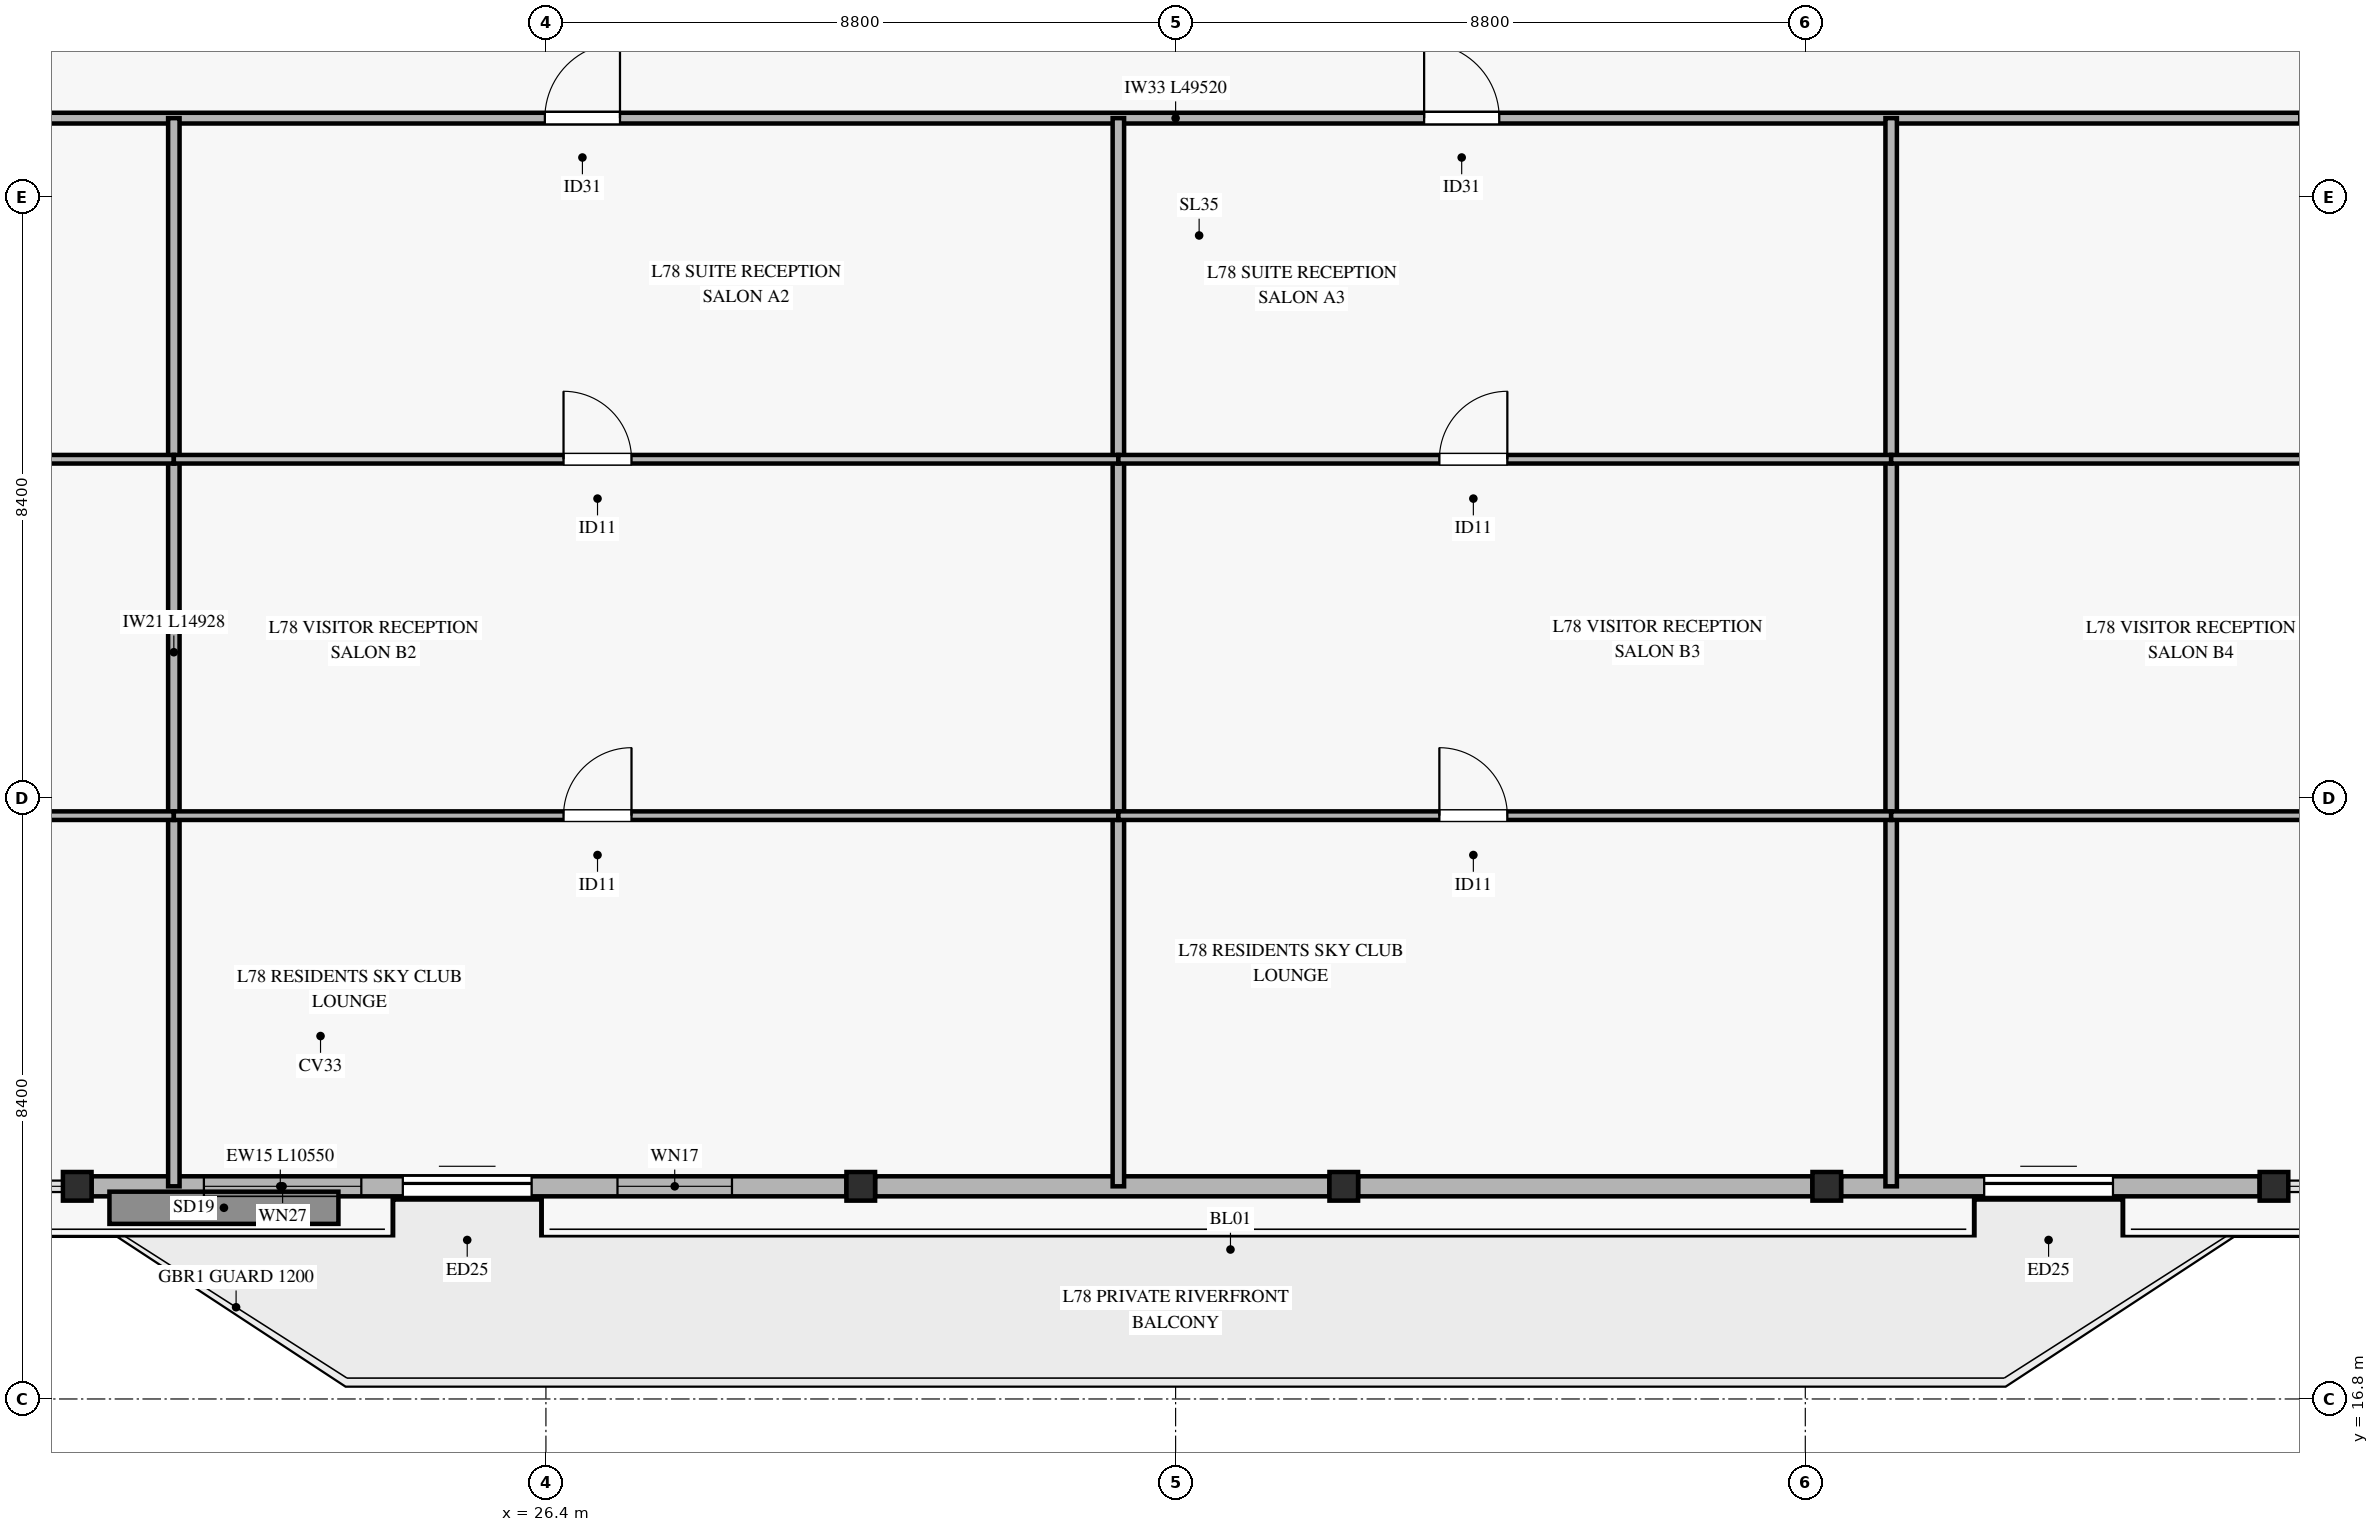
"""IFC4 building model, lengths in metres.
Left out: names, types, materials, properties, quantities, classifications, styles, units other than length and angle.
Written with IfcOpenShell. Run it as: python <this file> out.ifc"""

import sys

from ifc_helpers import new_model, si_unit, direction, frame, frame_2d, origin, origin_2d, place, context, subcontext, project, spatial, rectangle, hollow_rectangle, extrude, source, transform, mapped, element, fill, save


model = new_model("IFC4")
c1 = context("Model", 3, precision=1e-05, world=origin(), true_north=direction((0.0, 1.0)))
c2 = subcontext(c1, "Body", "Model", "MODEL_VIEW")
j1 = project(units=[si_unit("LENGTHUNIT", "METRE"), si_unit("PLANEANGLEUNIT", "RADIAN")], contexts=[c1])
p1 = place(None, origin())
s1 = spatial("IfcSite", under=j1, at=p1, CompositionType="ELEMENT")
p2 = place(p1, origin())
s2 = spatial("IfcBuilding", under=s1, at=p2, CompositionType="ELEMENT")
p3 = place(p2, frame((0.0, 0.0, 304.0)))
s3 = spatial("IfcBuildingStorey", under=s2, at=p3, CompositionType="ELEMENT", Elevation=304.0)
m1 = source(origin(), c2, "Body", "SweptSolid", [
    extrude(hollow_rectangle(XDim=0.4, YDim=0.4, WallThickness=0.02, at=origin_2d()), origin(), (0.0, 0.0, 1.0), 3.185),
])
for number, where, z_axis, x_axis in (
    (1, (19.85, 19.772, 0.0), (0.0, 0.0, 1.0), (1.0, 0.0, 0.0)),
    (2, (30.8, 19.772, 0.0), (0.0, 0.0, 1.0), (1.0, 0.0, 0.0)),
    (3, (37.55, 19.772, 0.0), (0.0, 0.0, 1.0), (1.0, 0.0, 0.0)),
    (4, (44.3, 19.772, 0.0), (0.0, 0.0, 1.0), (1.0, 0.0, 0.0)),
    (5, (50.55, 19.772, 0.0), (0.0, 0.0, 1.0), (1.0, 0.0, 0.0)),
):
    element("IfcColumn", number, at=place(p3, frame(where, z_axis=z_axis, x_axis=x_axis)), inside=s3, PredefinedType="COLUMN", context=c2, shape_type="MappedRepresentation", body=[
        mapped(m1, transform((0.0, 0.0, 0.0), x_axis=(1.0, 0.0, 0.0), y_axis=(0.0, 1.0, 0.0), z_axis=(0.0, 0.0, 1.0), scale=1.0)),
    ])
p4 = place(p3, frame((20.05, 19.772, 0.0), z_axis=(0.0, 0.0, 1.0), x_axis=(1.0, 0.0, 0.0)))
e6 = element("IfcWall", 6, at=p4, inside=s3, PredefinedType="SOLIDWALL", context=c2, shape_type="SweptSolid", body=[
    extrude(rectangle(XDim=10.55, YDim=0.28, at=frame_2d((5.275, 0.0))), origin(), (0.0, 0.0, 1.0), 2.815),
])
p5 = place(p4, frame((4.35, 0.0, 0.0)))
e7 = element("IfcOpeningElement", 7, at=p5, cuts=e6, PredefinedType="OPENING", context=c2, shape_type="SweptSolid", body=[
    extrude(rectangle(XDim=1.8, YDim=2.25, at=frame_2d((0.9, 1.125))), frame((0.0, 0.15, 0.0), z_axis=(0.0, -1.0, 0.0), x_axis=(1.0, 0.0, 0.0)), (0.0, 0.0, 1.0), 0.3),
])
p6 = place(p4, frame((1.57, 0.0, 0.45)))
e8 = element("IfcOpeningElement", 8, at=p6, cuts=e6, PredefinedType="OPENING", context=c2, shape_type="SweptSolid", body=[
    extrude(rectangle(XDim=2.2, YDim=2.1, at=frame_2d((1.1, 1.05))), frame((0.0, 0.15, 0.0), z_axis=(0.0, -1.0, 0.0), x_axis=(1.0, 0.0, 0.0)), (0.0, 0.0, 1.0), 0.3),
])
p7 = place(p4, frame((7.35, 0.0, 0.45)))
e9 = element("IfcOpeningElement", 9, at=p7, cuts=e6, PredefinedType="OPENING", context=c2, shape_type="SweptSolid", body=[
    extrude(rectangle(XDim=1.6, YDim=2.0, at=frame_2d((0.8, 1.0))), frame((0.0, 0.15, 0.0), z_axis=(0.0, -1.0, 0.0), x_axis=(1.0, 0.0, 0.0)), (0.0, 0.0, 1.0), 0.3),
])
for number, where, z_axis, x_axis in (
    (10, (31.0, 19.772, 0.0), (0.0, 0.0, 1.0), (1.0, 0.0, 0.0)),
    (11, (37.75, 19.772, 0.0), (0.0, 0.0, 1.0), (1.0, 0.0, 0.0)),
):
    element("IfcWall", number, at=place(p3, frame(where, z_axis=z_axis, x_axis=x_axis)), inside=s3, PredefinedType="SOLIDWALL", context=c2, shape_type="SweptSolid", body=[
        extrude(rectangle(XDim=6.35, YDim=0.28, at=frame_2d((3.175, 0.0))), origin(), (0.0, 0.0, 1.0), 2.815),
    ])
p8 = place(p3, frame((44.5, 19.772, 0.0), z_axis=(0.0, 0.0, 1.0), x_axis=(1.0, 0.0, 0.0)))
e12 = element("IfcWall", 12, at=p8, inside=s3, PredefinedType="SOLIDWALL", context=c2, shape_type="SweptSolid", body=[
    extrude(rectangle(XDim=5.85, YDim=0.28, at=frame_2d((2.925, 0.0))), origin(), (0.0, 0.0, 1.0), 2.815),
])
p9 = place(p8, frame((2.0, 0.0, 0.0)))
e13 = element("IfcOpeningElement", 13, at=p9, cuts=e12, PredefinedType="OPENING", context=c2, shape_type="SweptSolid", body=[
    extrude(rectangle(XDim=1.8, YDim=2.25, at=frame_2d((0.9, 1.125))), frame((0.0, 0.15, 0.0), z_axis=(0.0, -1.0, 0.0), x_axis=(1.0, 0.0, 0.0)), (0.0, 0.0, 1.0), 0.3),
])
p10 = place(p3, frame((10.44, 34.7, 0.0), z_axis=(0.0, 0.0, 1.0), x_axis=(1.0, 0.0, 0.0)))
e14 = element("IfcWall", 14, at=p10, inside=s3, PredefinedType="PARTITIONING", context=c2, shape_type="SweptSolid", body=[
    extrude(rectangle(XDim=49.52, YDim=0.15, at=frame_2d((24.76, 0.0))), origin(), (0.0, 0.0, 1.0), 2.47),
])
p11 = place(p10, frame((4.382, 0.0, 0.0)))
e15 = element("IfcOpeningElement", 15, at=p11, cuts=e14, PredefinedType="OPENING", context=c2, shape_type="SweptSolid", body=[
    extrude(rectangle(XDim=1.05, YDim=2.15, at=frame_2d((0.525, 1.075))), frame((0.0, 0.085, 0.0), z_axis=(0.0, -1.0, 0.0), x_axis=(1.0, 0.0, 0.0)), (0.0, 0.0, 1.0), 0.17),
])
p12 = place(p10, frame((15.945, 0.0, 0.0)))
e16 = element("IfcOpeningElement", 16, at=p12, cuts=e14, PredefinedType="OPENING", context=c2, shape_type="SweptSolid", body=[
    extrude(rectangle(XDim=1.05, YDim=2.15, at=frame_2d((0.525, 1.075))), frame((0.0, 0.085, 0.0), z_axis=(0.0, -1.0, 0.0), x_axis=(1.0, 0.0, 0.0)), (0.0, 0.0, 1.0), 0.17),
])
p13 = place(p10, frame((28.233, 0.0, 0.0)))
e17 = element("IfcOpeningElement", 17, at=p13, cuts=e14, PredefinedType="OPENING", context=c2, shape_type="SweptSolid", body=[
    extrude(rectangle(XDim=1.05, YDim=2.15, at=frame_2d((0.525, 1.075))), frame((0.0, 0.085, 0.0), z_axis=(0.0, -1.0, 0.0), x_axis=(1.0, 0.0, 0.0)), (0.0, 0.0, 1.0), 0.17),
])
p14 = place(p10, frame((40.462, 0.0, 0.0)))
e18 = element("IfcOpeningElement", 18, at=p14, cuts=e14, PredefinedType="OPENING", context=c2, shape_type="SweptSolid", body=[
    extrude(rectangle(XDim=1.05, YDim=2.15, at=frame_2d((0.525, 1.075))), frame((0.0, 0.085, 0.0), z_axis=(0.0, -1.0, 0.0), x_axis=(1.0, 0.0, 0.0)), (0.0, 0.0, 1.0), 0.17),
])
for number, where, z_axis, x_axis in (
    (19, (21.2, 19.772, 0.0), (0.0, 0.0, 1.0), (0.0, 1.0, 0.0)),
    (20, (34.4, 19.772, 0.0), (0.0, 0.0, 1.0), (0.0, 1.0, 0.0)),
    (21, (45.2, 19.772, 0.0), (0.0, 0.0, 1.0), (0.0, 1.0, 0.0)),
):
    element("IfcWall", number, at=place(p3, frame(where, z_axis=z_axis, x_axis=x_axis)), inside=s3, PredefinedType="PARTITIONING", context=c2, shape_type="SweptSolid", body=[
        extrude(rectangle(XDim=14.928, YDim=0.16, at=frame_2d((7.464, 0.0))), origin(), (0.0, 0.0, 1.0), 2.77),
    ])
p15 = place(p3, frame((10.44, 24.952, 0.0), z_axis=(0.0, 0.0, 1.0), x_axis=(1.0, 0.0, 0.0)))
e22 = element("IfcWall", 22, at=p15, inside=s3, PredefinedType="PARTITIONING", context=c2, shape_type="SweptSolid", body=[
    extrude(rectangle(XDim=10.76, YDim=0.12, at=frame_2d((5.38, 0.0))), origin(), (0.0, 0.0, 1.0), 2.47),
])
p16 = place(p15, frame((4.59, 0.0, 0.0)))
e23 = element("IfcOpeningElement", 23, at=p16, cuts=e22, PredefinedType="OPENING", context=c2, shape_type="SweptSolid", body=[
    extrude(rectangle(XDim=0.95, YDim=2.1, at=frame_2d((0.475, 1.05))), frame((0.0, 0.07, 0.0), z_axis=(0.0, -1.0, 0.0), x_axis=(1.0, 0.0, 0.0)), (0.0, 0.0, 1.0), 0.14),
])
p17 = place(p3, frame((10.44, 29.933, 0.0), z_axis=(0.0, 0.0, 1.0), x_axis=(1.0, 0.0, 0.0)))
e24 = element("IfcWall", 24, at=p17, inside=s3, PredefinedType="PARTITIONING", context=c2, shape_type="SweptSolid", body=[
    extrude(rectangle(XDim=10.76, YDim=0.12, at=frame_2d((5.38, 0.0))), origin(), (0.0, 0.0, 1.0), 2.47),
])
p18 = place(p17, frame((4.59, 0.0, 0.0)))
e25 = element("IfcOpeningElement", 25, at=p18, cuts=e24, PredefinedType="OPENING", context=c2, shape_type="SweptSolid", body=[
    extrude(rectangle(XDim=0.95, YDim=2.1, at=frame_2d((0.475, 1.05))), frame((0.0, 0.07, 0.0), z_axis=(0.0, -1.0, 0.0), x_axis=(1.0, 0.0, 0.0)), (0.0, 0.0, 1.0), 0.14),
])
p19 = place(p3, frame((21.2, 24.952, 0.0), z_axis=(0.0, 0.0, 1.0), x_axis=(1.0, 0.0, 0.0)))
e26 = element("IfcWall", 26, at=p19, inside=s3, PredefinedType="PARTITIONING", context=c2, shape_type="SweptSolid", body=[
    extrude(rectangle(XDim=13.2, YDim=0.12, at=frame_2d((6.6, 0.0))), origin(), (0.0, 0.0, 1.0), 2.47),
])
p20 = place(p19, frame((5.446, 0.0, 0.0)))
e27 = element("IfcOpeningElement", 27, at=p20, cuts=e26, PredefinedType="OPENING", context=c2, shape_type="SweptSolid", body=[
    extrude(rectangle(XDim=0.95, YDim=2.1, at=frame_2d((0.475, 1.05))), frame((0.0, 0.07, 0.0), z_axis=(0.0, -1.0, 0.0), x_axis=(1.0, 0.0, 0.0)), (0.0, 0.0, 1.0), 0.14),
])
p21 = place(p3, frame((21.2, 29.933, 0.0), z_axis=(0.0, 0.0, 1.0), x_axis=(1.0, 0.0, 0.0)))
e28 = element("IfcWall", 28, at=p21, inside=s3, PredefinedType="PARTITIONING", context=c2, shape_type="SweptSolid", body=[
    extrude(rectangle(XDim=13.2, YDim=0.12, at=frame_2d((6.6, 0.0))), origin(), (0.0, 0.0, 1.0), 2.47),
])
p22 = place(p21, frame((5.446, 0.0, 0.0)))
e29 = element("IfcOpeningElement", 29, at=p22, cuts=e28, PredefinedType="OPENING", context=c2, shape_type="SweptSolid", body=[
    extrude(rectangle(XDim=0.95, YDim=2.1, at=frame_2d((0.475, 1.05))), frame((0.0, 0.07, 0.0), z_axis=(0.0, -1.0, 0.0), x_axis=(1.0, 0.0, 0.0)), (0.0, 0.0, 1.0), 0.14),
])
p23 = place(p3, frame((34.4, 24.952, 0.0), z_axis=(0.0, 0.0, 1.0), x_axis=(1.0, 0.0, 0.0)))
e30 = element("IfcWall", 30, at=p23, inside=s3, PredefinedType="PARTITIONING", context=c2, shape_type="SweptSolid", body=[
    extrude(rectangle(XDim=10.8, YDim=0.12, at=frame_2d((5.4, 0.0))), origin(), (0.0, 0.0, 1.0), 2.47),
])
p24 = place(p23, frame((4.486, 0.0, 0.0)))
e31 = element("IfcOpeningElement", 31, at=p24, cuts=e30, PredefinedType="OPENING", context=c2, shape_type="SweptSolid", body=[
    extrude(rectangle(XDim=0.95, YDim=2.1, at=frame_2d((0.475, 1.05))), frame((0.0, 0.07, 0.0), z_axis=(0.0, -1.0, 0.0), x_axis=(1.0, 0.0, 0.0)), (0.0, 0.0, 1.0), 0.14),
])
p25 = place(p3, frame((34.4, 29.933, 0.0), z_axis=(0.0, 0.0, 1.0), x_axis=(1.0, 0.0, 0.0)))
e32 = element("IfcWall", 32, at=p25, inside=s3, PredefinedType="PARTITIONING", context=c2, shape_type="SweptSolid", body=[
    extrude(rectangle(XDim=10.8, YDim=0.12, at=frame_2d((5.4, 0.0))), origin(), (0.0, 0.0, 1.0), 2.47),
])
p26 = place(p25, frame((4.486, 0.0, 0.0)))
e33 = element("IfcOpeningElement", 33, at=p26, cuts=e32, PredefinedType="OPENING", context=c2, shape_type="SweptSolid", body=[
    extrude(rectangle(XDim=0.95, YDim=2.1, at=frame_2d((0.475, 1.05))), frame((0.0, 0.07, 0.0), z_axis=(0.0, -1.0, 0.0), x_axis=(1.0, 0.0, 0.0)), (0.0, 0.0, 1.0), 0.14),
])
p27 = place(p3, frame((45.2, 24.952, 0.0), z_axis=(0.0, 0.0, 1.0), x_axis=(1.0, 0.0, 0.0)))
e34 = element("IfcWall", 34, at=p27, inside=s3, PredefinedType="PARTITIONING", context=c2, shape_type="SweptSolid", body=[
    extrude(rectangle(XDim=14.76, YDim=0.12, at=frame_2d((7.38, 0.0))), origin(), (0.0, 0.0, 1.0), 2.47),
])
p28 = place(p27, frame((5.99, 0.0, 0.0)))
e35 = element("IfcOpeningElement", 35, at=p28, cuts=e34, PredefinedType="OPENING", context=c2, shape_type="SweptSolid", body=[
    extrude(rectangle(XDim=0.95, YDim=2.1, at=frame_2d((0.475, 1.05))), frame((0.0, 0.07, 0.0), z_axis=(0.0, -1.0, 0.0), x_axis=(1.0, 0.0, 0.0)), (0.0, 0.0, 1.0), 0.14),
])
p29 = place(p3, frame((45.2, 29.933, 0.0), z_axis=(0.0, 0.0, 1.0), x_axis=(1.0, 0.0, 0.0)))
e36 = element("IfcWall", 36, at=p29, inside=s3, PredefinedType="PARTITIONING", context=c2, shape_type="SweptSolid", body=[
    extrude(rectangle(XDim=14.76, YDim=0.12, at=frame_2d((7.38, 0.0))), origin(), (0.0, 0.0, 1.0), 2.47),
])
p30 = place(p29, frame((5.99, 0.0, 0.0)))
e37 = element("IfcOpeningElement", 37, at=p30, cuts=e36, PredefinedType="OPENING", context=c2, shape_type="SweptSolid", body=[
    extrude(rectangle(XDim=0.95, YDim=2.1, at=frame_2d((0.475, 1.05))), frame((0.0, 0.07, 0.0), z_axis=(0.0, -1.0, 0.0), x_axis=(1.0, 0.0, 0.0)), (0.0, 0.0, 1.0), 0.14),
])
m2 = source(origin(), c2, "Body", "SweptSolid", [
    extrude(rectangle(XDim=1.8, YDim=2.25, at=frame_2d((0.9, 1.125))), frame((0.0, 0.025, 0.0), z_axis=(0.0, -1.0, 0.0), x_axis=(1.0, 0.0, 0.0)), (0.0, 0.0, 1.0), 0.05),
])
p31 = place(p5, origin())
e38 = element("IfcDoor", 38, at=p31, inside=s3, OperationType="SLIDING_TO_LEFT", PredefinedType="DOOR", context=c2, shape_type="MappedRepresentation", body=[
    mapped(m2, transform((0.0, 0.0, 0.0), x_axis=(1.0, 0.0, 0.0), y_axis=(0.0, 1.0, 0.0), z_axis=(0.0, 0.0, 1.0), scale=1.0)),
])
fill(e7, e38)
m3 = source(origin(), c2, "Body", "SweptSolid", [
    extrude(rectangle(XDim=2.2, YDim=2.1, at=frame_2d((1.1, 1.05))), frame((0.0, 0.03, 0.0), z_axis=(0.0, -1.0, 0.0), x_axis=(1.0, 0.0, 0.0)), (0.0, 0.0, 1.0), 0.06),
])
p32 = place(p6, origin())
e39 = element("IfcWindow", 39, at=p32, inside=s3, PartitioningType="SINGLE_PANEL", PredefinedType="WINDOW", context=c2, shape_type="MappedRepresentation", body=[
    mapped(m3, transform((0.0, 0.0, 0.0), x_axis=(1.0, 0.0, 0.0), y_axis=(0.0, 1.0, 0.0), z_axis=(0.0, 0.0, 1.0), scale=1.0)),
])
fill(e8, e39)
m4 = source(origin(), c2, "Body", "SweptSolid", [
    extrude(rectangle(XDim=1.6, YDim=2.0, at=frame_2d((0.8, 1.0))), frame((0.0, 0.03, 0.0), z_axis=(0.0, -1.0, 0.0), x_axis=(1.0, 0.0, 0.0)), (0.0, 0.0, 1.0), 0.06),
])
p33 = place(p7, origin())
e40 = element("IfcWindow", 40, at=p33, inside=s3, PartitioningType="SINGLE_PANEL", PredefinedType="WINDOW", context=c2, shape_type="MappedRepresentation", body=[
    mapped(m4, transform((0.0, 0.0, 0.0), x_axis=(1.0, 0.0, 0.0), y_axis=(0.0, 1.0, 0.0), z_axis=(0.0, 0.0, 1.0), scale=1.0)),
])
fill(e9, e40)
p34 = place(p9, origin())
e41 = element("IfcDoor", 41, at=p34, inside=s3, OperationType="SLIDING_TO_LEFT", PredefinedType="DOOR", context=c2, shape_type="MappedRepresentation", body=[
    mapped(m2, transform((0.0, 0.0, 0.0), x_axis=(1.0, 0.0, 0.0), y_axis=(0.0, 1.0, 0.0), z_axis=(0.0, 0.0, 1.0), scale=1.0)),
])
fill(e13, e41)
m5 = source(origin(), c2, "Body", "SweptSolid", [
    extrude(rectangle(XDim=1.05, YDim=2.15, at=frame_2d((0.525, 1.075))), frame((0.0, 0.025, 0.0), z_axis=(0.0, -1.0, 0.0), x_axis=(1.0, 0.0, 0.0)), (0.0, 0.0, 1.0), 0.05),
])
p35 = place(p12, origin())
e42 = element("IfcDoor", 42, at=p35, inside=s3, OperationType="SINGLE_SWING_RIGHT", PredefinedType="DOOR", context=c2, shape_type="MappedRepresentation", body=[
    mapped(m5, transform((0.0, 0.0, 0.0), x_axis=(1.0, 0.0, 0.0), y_axis=(0.0, 1.0, 0.0), z_axis=(0.0, 0.0, 1.0), scale=1.0)),
])
fill(e16, e42)
m6 = source(origin(), c2, "Body", "SweptSolid", [
    extrude(rectangle(XDim=0.95, YDim=2.1, at=frame_2d((0.475, 1.05))), frame((0.0, 0.025, 0.0), z_axis=(0.0, -1.0, 0.0), x_axis=(1.0, 0.0, 0.0)), (0.0, 0.0, 1.0), 0.05),
])
p36 = place(p22, origin())
e43 = element("IfcDoor", 43, at=p36, inside=s3, OperationType="SINGLE_SWING_LEFT", PredefinedType="DOOR", context=c2, shape_type="MappedRepresentation", body=[
    mapped(m6, transform((0.0, 0.0, 0.0), x_axis=(1.0, 0.0, 0.0), y_axis=(0.0, 1.0, 0.0), z_axis=(0.0, 0.0, 1.0), scale=1.0)),
])
fill(e29, e43)
p37 = place(p20, origin())
e44 = element("IfcDoor", 44, at=p37, inside=s3, OperationType="SINGLE_SWING_RIGHT", PredefinedType="DOOR", context=c2, shape_type="MappedRepresentation", body=[
    mapped(m6, transform((0.0, 0.0, 0.0), x_axis=(1.0, 0.0, 0.0), y_axis=(0.0, 1.0, 0.0), z_axis=(0.0, 0.0, 1.0), scale=1.0)),
])
fill(e27, e44)
p38 = place(p13, origin())
e45 = element("IfcDoor", 45, at=p38, inside=s3, OperationType="SINGLE_SWING_LEFT", PredefinedType="DOOR", context=c2, shape_type="MappedRepresentation", body=[
    mapped(m5, transform((0.0, 0.0, 0.0), x_axis=(1.0, 0.0, 0.0), y_axis=(0.0, 1.0, 0.0), z_axis=(0.0, 0.0, 1.0), scale=1.0)),
])
fill(e17, e45)
p39 = place(p26, origin())
e46 = element("IfcDoor", 46, at=p39, inside=s3, OperationType="SINGLE_SWING_RIGHT", PredefinedType="DOOR", context=c2, shape_type="MappedRepresentation", body=[
    mapped(m6, transform((0.0, 0.0, 0.0), x_axis=(1.0, 0.0, 0.0), y_axis=(0.0, 1.0, 0.0), z_axis=(0.0, 0.0, 1.0), scale=1.0)),
])
fill(e33, e46)
p40 = place(p24, origin())
e47 = element("IfcDoor", 47, at=p40, inside=s3, OperationType="SINGLE_SWING_LEFT", PredefinedType="DOOR", context=c2, shape_type="MappedRepresentation", body=[
    mapped(m6, transform((0.0, 0.0, 0.0), x_axis=(1.0, 0.0, 0.0), y_axis=(0.0, 1.0, 0.0), z_axis=(0.0, 0.0, 1.0), scale=1.0)),
])
fill(e31, e47)
save(model, sys.argv[1])
